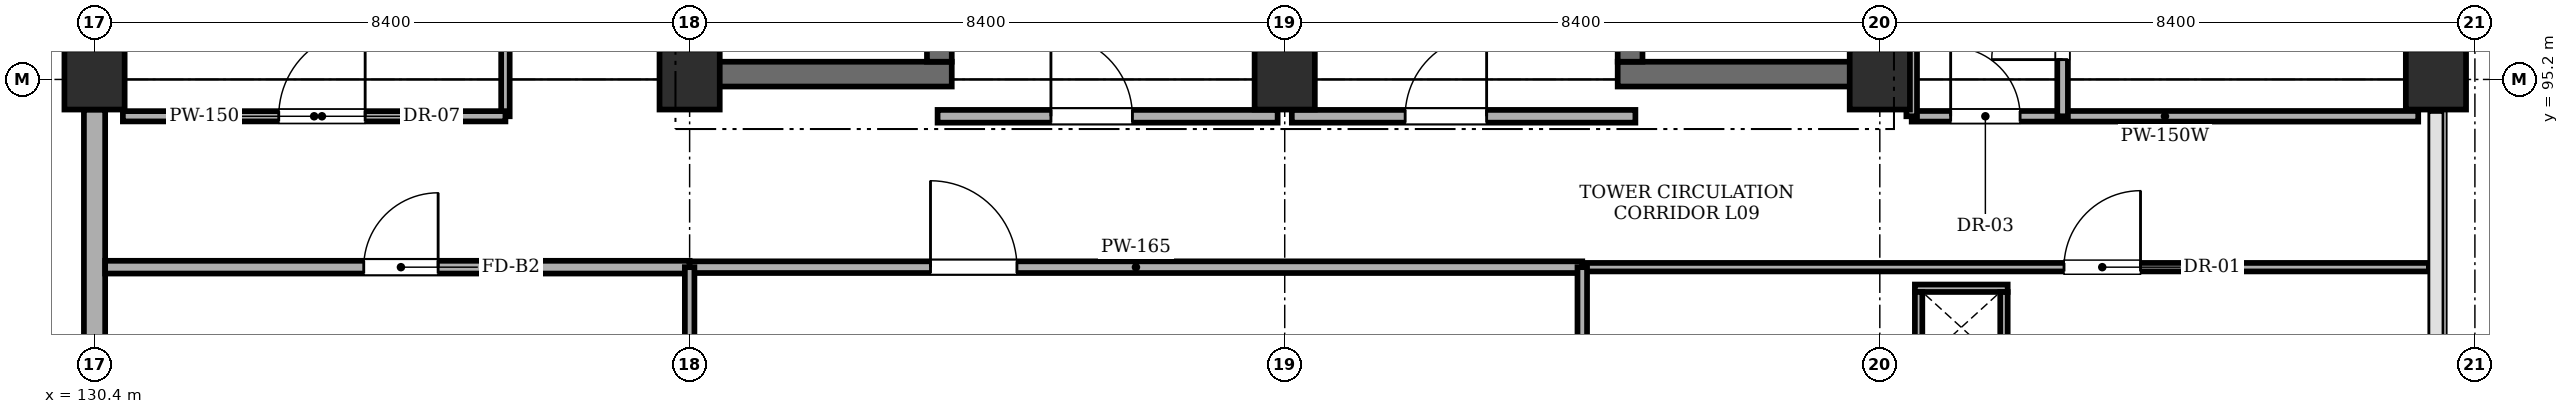
"""IFC4 building model, lengths in metres.
Left out: names, types, materials, properties, quantities, classifications, styles, units other than length and angle.
Written with IfcOpenShell. Run it as: python <this file> out.ifc"""

import sys

from ifc_helpers import new_model, si_unit, direction, frame, frame_2d, origin, origin_2d, place, context, subcontext, project, spatial, rectangle, extrude, element, fill, save


model = new_model("IFC4")
c1 = context("Model", 3, precision=1e-05, world=origin(), true_north=direction((0.0, 1.0)))
c2 = subcontext(c1, "Body", "Model", "MODEL_VIEW")
j1 = project(units=[si_unit("LENGTHUNIT", "METRE"), si_unit("PLANEANGLEUNIT", "RADIAN")], contexts=[c1])
p1 = place(None, origin())
s1 = spatial("IfcSite", under=j1, at=p1, CompositionType="ELEMENT")
p2 = place(p1, origin())
s2 = spatial("IfcBuilding", under=s1, at=p2, CompositionType="ELEMENT")
p3 = place(p2, frame((0.0, 0.0, 36.0)))
s3 = spatial("IfcBuildingStorey", under=s2, at=p3, CompositionType="ELEMENT", Elevation=36.0)
for number, where, z_axis, x_axis in (
    (1, (130.4, 95.2, 0.0), (0.0, 0.0, 1.0), (1.0, 0.0, 0.0)),
    (2, (138.8, 95.2, 0.0), (0.0, 0.0, 1.0), (1.0, 0.0, 0.0)),
    (3, (147.2, 95.2, 0.0), (0.0, 0.0, 1.0), (1.0, 0.0, 0.0)),
    (4, (155.6, 95.2, 0.0), (0.0, 0.0, 1.0), (1.0, 0.0, 0.0)),
    (5, (163.45, 95.2, 0.0), (0.0, 0.0, 1.0), (1.0, 0.0, 0.0)),
):
    element("IfcColumn", number, at=place(p3, frame(where, z_axis=z_axis, x_axis=x_axis)), inside=s3, PredefinedType="COLUMN", context=c2, shape_type="SweptSolid", body=[
        extrude(rectangle(XDim=0.85, YDim=0.85, at=origin_2d()), origin(), (0.0, 0.0, 1.0), 4.02),
    ])
p4 = place(p3, frame((138.7, 95.275, 0.0), z_axis=(0.0, 0.0, 1.0), x_axis=(1.0, 0.0, 0.0)))
e6 = element("IfcWall", 6, at=p4, inside=s3, PredefinedType="SHEAR", context=c2, shape_type="SweptSolid", body=[
    extrude(rectangle(XDim=3.8, YDim=0.35, at=frame_2d((1.9, 0.0))), origin(), (0.0, 0.0, 1.0), 4.02),
])
p5 = place(p3, frame((138.875, 95.45, 0.0), z_axis=(0.0, 0.0, 1.0), x_axis=(0.0, 1.0, 0.0)))
e7 = element("IfcWall", 7, at=p5, inside=s3, PredefinedType="SHEAR", context=c2, shape_type="SweptSolid", body=[
    extrude(rectangle(XDim=7.9, YDim=0.35, at=frame_2d((3.95, 0.0))), origin(), (0.0, 0.0, 1.0), 4.02),
])
p6 = place(p3, frame((142.325, 95.45, 0.0), z_axis=(0.0, 0.0, 1.0), x_axis=(0.0, 1.0, 0.0)))
e8 = element("IfcWall", 8, at=p6, inside=s3, PredefinedType="SHEAR", context=c2, shape_type="SweptSolid", body=[
    extrude(rectangle(XDim=7.9, YDim=0.35, at=frame_2d((3.95, 0.0))), origin(), (0.0, 0.0, 1.0), 4.02),
])
p7 = place(p6, frame((0.22, 0.0, 0.0)))
e9 = element("IfcOpeningElement", 9, at=p7, cuts=e8, PredefinedType="OPENING", context=c2, shape_type="SweptSolid", body=[
    extrude(rectangle(XDim=1.15, YDim=2.15, at=frame_2d((0.575, 1.075))), frame((0.0, 0.185, 0.0), z_axis=(0.0, -1.0, 0.0), x_axis=(1.0, 0.0, 0.0)), (0.0, 0.0, 1.0), 0.37),
])
p8 = place(p3, frame((151.9, 95.275, 0.0), z_axis=(0.0, 0.0, 1.0), x_axis=(1.0, 0.0, 0.0)))
e10 = element("IfcWall", 10, at=p8, inside=s3, PredefinedType="SHEAR", context=c2, shape_type="SweptSolid", body=[
    extrude(rectangle(XDim=3.8, YDim=0.35, at=frame_2d((1.9, 0.0))), origin(), (0.0, 0.0, 1.0), 4.02),
])
p9 = place(p3, frame((152.075, 95.45, 0.0), z_axis=(0.0, 0.0, 1.0), x_axis=(0.0, 1.0, 0.0)))
e11 = element("IfcWall", 11, at=p9, inside=s3, PredefinedType="SHEAR", context=c2, shape_type="SweptSolid", body=[
    extrude(rectangle(XDim=7.9, YDim=0.35, at=frame_2d((3.95, 0.0))), origin(), (0.0, 0.0, 1.0), 4.02),
])
p10 = place(p9, frame((0.35, 0.0, 0.0)))
e12 = element("IfcOpeningElement", 12, at=p10, cuts=e11, PredefinedType="OPENING", context=c2, shape_type="SweptSolid", body=[
    extrude(rectangle(XDim=1.15, YDim=2.15, at=frame_2d((0.575, 1.075))), frame((0.0, 0.185, 0.0), z_axis=(0.0, -1.0, 0.0), x_axis=(1.0, 0.0, 0.0)), (0.0, 0.0, 1.0), 0.37),
])
p11 = place(p3, frame((155.525, 95.45, 0.0), z_axis=(0.0, 0.0, 1.0), x_axis=(0.0, 1.0, 0.0)))
e13 = element("IfcWall", 13, at=p11, inside=s3, PredefinedType="SHEAR", context=c2, shape_type="SweptSolid", body=[
    extrude(rectangle(XDim=7.9, YDim=0.35, at=frame_2d((3.95, 0.0))), origin(), (0.0, 0.0, 1.0), 4.02),
])
p12 = place(p3, frame((130.4, 87.225, 0.0), z_axis=(0.0, 0.0, 1.0), x_axis=(0.0, 1.0, 0.0)))
e14 = element("IfcWall", 14, at=p12, inside=s3, PredefinedType="STANDARD", context=c2, shape_type="SweptSolid", body=[
    extrude(rectangle(XDim=7.55, YDim=0.3, at=frame_2d((3.775, 0.0))), origin(), (0.0, 0.0, 1.0), 3.32),
])
p13 = place(p12, frame((2.4, 0.0, 0.95)))
e15 = element("IfcOpeningElement", 15, at=p13, cuts=e14, PredefinedType="OPENING", context=c2, shape_type="SweptSolid", body=[
    extrude(rectangle(XDim=1.5, YDim=1.8, at=frame_2d((0.75, 0.9))), frame((0.0, 0.16, 0.0), z_axis=(0.0, -1.0, 0.0), x_axis=(1.0, 0.0, 0.0)), (0.0, 0.0, 1.0), 0.32),
])
p14 = place(p3, frame((142.3, 94.68, 0.0), z_axis=(0.0, 0.0, 1.0), x_axis=(1.0, 0.0, 0.0)))
e16 = element("IfcWall", 16, at=p14, inside=s3, PredefinedType="STANDARD", context=c2, shape_type="SweptSolid", body=[
    extrude(rectangle(XDim=4.8, YDim=0.18, at=frame_2d((2.4, 0.0))), origin(), (0.0, 0.0, 1.0), 4.02),
])
p15 = place(p14, frame((1.6, 0.0, 0.0)))
e17 = element("IfcOpeningElement", 17, at=p15, cuts=e16, PredefinedType="OPENING", context=c2, shape_type="SweptSolid", body=[
    extrude(rectangle(XDim=1.15, YDim=2.15, at=frame_2d((0.575, 1.075))), frame((0.0, 0.1, 0.0), z_axis=(0.0, -1.0, 0.0), x_axis=(1.0, 0.0, 0.0)), (0.0, 0.0, 1.0), 0.2),
])
p16 = place(p3, frame((147.3, 94.68, 0.0), z_axis=(0.0, 0.0, 1.0), x_axis=(1.0, 0.0, 0.0)))
e18 = element("IfcWall", 18, at=p16, inside=s3, PredefinedType="STANDARD", context=c2, shape_type="SweptSolid", body=[
    extrude(rectangle(XDim=4.85, YDim=0.18, at=frame_2d((2.425, 0.0))), origin(), (0.0, 0.0, 1.0), 4.02),
])
p17 = place(p16, frame((1.6, 0.0, 0.0)))
e19 = element("IfcOpeningElement", 19, at=p17, cuts=e18, PredefinedType="OPENING", context=c2, shape_type="SweptSolid", body=[
    extrude(rectangle(XDim=1.15, YDim=2.15, at=frame_2d((0.575, 1.075))), frame((0.0, 0.1, 0.0), z_axis=(0.0, -1.0, 0.0), x_axis=(1.0, 0.0, 0.0)), (0.0, 0.0, 1.0), 0.2),
])
p18 = place(p3, frame((156.05, 94.68, 0.0), z_axis=(0.0, 0.0, 1.0), x_axis=(1.0, 0.0, 0.0)))
e20 = element("IfcWall", 20, at=p18, inside=s3, PredefinedType="PARTITIONING", context=c2, shape_type="SweptSolid", body=[
    extrude(rectangle(XDim=7.15, YDim=0.15, at=frame_2d((3.575, 0.0))), origin(), (0.0, 0.0, 1.0), 4.02),
])
p19 = place(p18, frame((0.55, 0.0, 0.0)))
e21 = element("IfcOpeningElement", 21, at=p19, cuts=e20, PredefinedType="OPENING", context=c2, shape_type="SweptSolid", body=[
    extrude(rectangle(XDim=0.98, YDim=2.12, at=frame_2d((0.49, 1.06))), frame((0.0, 0.085, 0.0), z_axis=(0.0, -1.0, 0.0), x_axis=(1.0, 0.0, 0.0)), (0.0, 0.0, 1.0), 0.17),
])
p20 = place(p3, frame((158.18, 94.68, 0.0), z_axis=(0.0, 0.0, 1.0), x_axis=(0.0, 1.0, 0.0)))
e22 = element("IfcWall", 22, at=p20, inside=s3, PredefinedType="PARTITIONING", context=c2, shape_type="SweptSolid", body=[
    extrude(rectangle(XDim=8.57, YDim=0.15, at=frame_2d((4.285, 0.0))), origin(), (0.0, 0.0, 1.0), 4.02),
])
p21 = place(p20, frame((0.8, 0.0, 0.0)))
e23 = element("IfcOpeningElement", 23, at=p21, cuts=e22, PredefinedType="OPENING", context=c2, shape_type="SweptSolid", body=[
    extrude(rectangle(XDim=1.0, YDim=2.12, at=frame_2d((0.5, 1.06))), frame((0.0, 0.085, 0.0), z_axis=(0.0, -1.0, 0.0), x_axis=(1.0, 0.0, 0.0)), (0.0, 0.0, 1.0), 0.17),
])
p22 = place(p20, frame((3.5, 0.0, 0.0)))
e24 = element("IfcOpeningElement", 24, at=p22, cuts=e22, PredefinedType="OPENING", context=c2, shape_type="SweptSolid", body=[
    extrude(rectangle(XDim=0.92, YDim=2.1, at=frame_2d((0.46, 1.05))), frame((0.0, 0.085, 0.0), z_axis=(0.0, -1.0, 0.0), x_axis=(1.0, 0.0, 0.0)), (0.0, 0.0, 1.0), 0.17),
])
p23 = place(p20, frame((6.4, 0.0, 0.0)))
e25 = element("IfcOpeningElement", 25, at=p23, cuts=e22, PredefinedType="OPENING", context=c2, shape_type="SweptSolid", body=[
    extrude(rectangle(XDim=0.92, YDim=2.1, at=frame_2d((0.46, 1.05))), frame((0.0, 0.085, 0.0), z_axis=(0.0, -1.0, 0.0), x_axis=(1.0, 0.0, 0.0)), (0.0, 0.0, 1.0), 0.17),
])
p24 = place(p3, frame((156.05, 94.68, 0.0), z_axis=(0.0, 0.0, 1.0), x_axis=(0.0, 1.0, 0.0)))
e26 = element("IfcWall", 26, at=p24, inside=s3, PredefinedType="PARTITIONING", context=c2, shape_type="SweptSolid", body=[
    extrude(rectangle(XDim=8.57, YDim=0.15, at=frame_2d((4.285, 0.0))), origin(), (0.0, 0.0, 1.0), 4.02),
])
p25 = place(p3, frame((136.2, 94.68, 0.0), z_axis=(0.0, 0.0, 1.0), x_axis=(0.0, 1.0, 0.0)))
e27 = element("IfcWall", 27, at=p25, inside=s3, PredefinedType="PARTITIONING", context=c2, shape_type="SweptSolid", body=[
    extrude(rectangle(XDim=9.07, YDim=0.12, at=frame_2d((4.535, 0.0))), origin(), (0.0, 0.0, 1.0), 4.02),
])
p26 = place(p3, frame((130.8, 94.68, 0.0), z_axis=(0.0, 0.0, 1.0), x_axis=(1.0, 0.0, 0.0)))
e28 = element("IfcWall", 28, at=p26, inside=s3, PredefinedType="PARTITIONING", context=c2, shape_type="SweptSolid", body=[
    extrude(rectangle(XDim=5.4, YDim=0.145, at=frame_2d((2.7, 0.0))), origin(), (0.0, 0.0, 1.0), 4.02),
])
p27 = place(p26, frame((2.2, 0.0, 0.0)))
e29 = element("IfcOpeningElement", 29, at=p27, cuts=e28, PredefinedType="OPENING", context=c2, shape_type="SweptSolid", body=[
    extrude(rectangle(XDim=1.22, YDim=2.2, at=frame_2d((0.61, 1.1))), frame((0.0, 0.083, 0.0), z_axis=(0.0, -1.0, 0.0), x_axis=(1.0, 0.0, 0.0)), (0.0, 0.0, 1.0), 0.165),
])
p28 = place(p3, frame((130.55, 92.55, 0.0), z_axis=(0.0, 0.0, 1.0), x_axis=(1.0, 0.0, 0.0)))
e30 = element("IfcWall", 30, at=p28, inside=s3, PredefinedType="STANDARD", context=c2, shape_type="SweptSolid", body=[
    extrude(rectangle(XDim=8.25, YDim=0.18, at=frame_2d((4.125, 0.0))), origin(), (0.0, 0.0, 1.0), 4.02),
])
p29 = place(p28, frame((3.65, 0.0, 0.0)))
e31 = element("IfcOpeningElement", 31, at=p29, cuts=e30, PredefinedType="OPENING", context=c2, shape_type="SweptSolid", body=[
    extrude(rectangle(XDim=1.05, YDim=2.15, at=frame_2d((0.525, 1.075))), frame((0.0, 0.1, 0.0), z_axis=(0.0, -1.0, 0.0), x_axis=(1.0, 0.0, 0.0)), (0.0, 0.0, 1.0), 0.2),
])
p30 = place(p3, frame((138.8, 92.55, 0.0), z_axis=(0.0, 0.0, 1.0), x_axis=(1.0, 0.0, 0.0)))
e32 = element("IfcWall", 32, at=p30, inside=s3, PredefinedType="PARTITIONING", context=c2, shape_type="SweptSolid", body=[
    extrude(rectangle(XDim=12.6, YDim=0.165, at=frame_2d((6.3, 0.0))), origin(), (0.0, 0.0, 1.0), 4.02),
])
p31 = place(p30, frame((3.4, 0.0, 0.0)))
e33 = element("IfcOpeningElement", 33, at=p31, cuts=e32, PredefinedType="OPENING", context=c2, shape_type="SweptSolid", body=[
    extrude(rectangle(XDim=1.22, YDim=2.2, at=frame_2d((0.61, 1.1))), frame((0.0, 0.093, 0.0), z_axis=(0.0, -1.0, 0.0), x_axis=(1.0, 0.0, 0.0)), (0.0, 0.0, 1.0), 0.185),
])
p32 = place(p3, frame((138.8, 78.55, 0.0), z_axis=(0.0, 0.0, 1.0), x_axis=(0.0, 1.0, 0.0)))
e34 = element("IfcWall", 34, at=p32, inside=s3, PredefinedType="PARTITIONING", context=c2, shape_type="SweptSolid", body=[
    extrude(rectangle(XDim=14.0, YDim=0.135, at=frame_2d((7.0, 0.0))), origin(), (0.0, 0.0, 1.0), 3.32),
])
p33 = place(p3, frame((151.4, 92.55, 0.0), z_axis=(0.0, 0.0, 1.0), x_axis=(1.0, 0.0, 0.0)))
e35 = element("IfcWall", 35, at=p33, inside=s3, PredefinedType="PARTITIONING", context=c2, shape_type="SweptSolid", body=[
    extrude(rectangle(XDim=11.95, YDim=0.12, at=frame_2d((5.975, 0.0))), origin(), (0.0, 0.0, 1.0), 4.02),
])
p34 = place(p33, frame((6.8, 0.0, 0.0)))
e36 = element("IfcOpeningElement", 36, at=p34, cuts=e35, PredefinedType="OPENING", context=c2, shape_type="SweptSolid", body=[
    extrude(rectangle(XDim=1.08, YDim=2.15, at=frame_2d((0.54, 1.075))), frame((0.0, 0.07, 0.0), z_axis=(0.0, -1.0, 0.0), x_axis=(1.0, 0.0, 0.0)), (0.0, 0.0, 1.0), 0.14),
])
p35 = place(p3, frame((151.4, 78.55, 0.0), z_axis=(0.0, 0.0, 1.0), x_axis=(0.0, 1.0, 0.0)))
e37 = element("IfcWall", 37, at=p35, inside=s3, PredefinedType="PARTITIONING", context=c2, shape_type="SweptSolid", body=[
    extrude(rectangle(XDim=14.0, YDim=0.135, at=frame_2d((7.0, 0.0))), origin(), (0.0, 0.0, 1.0), 3.52),
])
p36 = place(p3, frame((156.095, 92.252, 0.0), z_axis=(0.0, 0.0, 1.0), x_axis=(1.0, 0.0, 0.0)))
e38 = element("IfcWall", 38, at=p36, inside=s3, PredefinedType="PARTITIONING", context=c2, shape_type="SweptSolid", body=[
    extrude(rectangle(XDim=1.31, YDim=0.105, at=frame_2d((0.655, 0.0))), origin(), (0.0, 0.0, 1.0), 4.02),
])
for number, where, z_axis, x_axis in (
    (39, (156.147, 91.2, 0.0), (0.0, 0.0, 1.0), (0.0, 1.0, 0.0)),
    (40, (157.353, 91.2, 0.0), (0.0, 0.0, 1.0), (0.0, 1.0, 0.0)),
):
    element("IfcWall", number, at=place(p3, frame(where, z_axis=z_axis, x_axis=x_axis)), inside=s3, PredefinedType="PARTITIONING", context=c2, shape_type="SweptSolid", body=[
        extrude(rectangle(XDim=1.0, YDim=0.105, at=frame_2d((0.5, 0.0))), origin(), (0.0, 0.0, 1.0), 4.02),
    ])
p37 = place(p15, origin())
e41 = element("IfcDoor", 41, at=p37, inside=s3, OperationType="SINGLE_SWING_LEFT", PredefinedType="DOOR", context=c2, shape_type="SweptSolid", body=[
    extrude(rectangle(XDim=1.15, YDim=2.15, at=frame_2d((0.575, 1.075))), frame((0.0, 0.025, 0.0), z_axis=(0.0, -1.0, 0.0), x_axis=(1.0, 0.0, 0.0)), (0.0, 0.0, 1.0), 0.05),
])
fill(e17, e41)
p38 = place(p17, origin())
e42 = element("IfcDoor", 42, at=p38, inside=s3, OperationType="SINGLE_SWING_RIGHT", PredefinedType="DOOR", context=c2, shape_type="SweptSolid", body=[
    extrude(rectangle(XDim=1.15, YDim=2.15, at=frame_2d((0.575, 1.075))), frame((0.0, 0.025, 0.0), z_axis=(0.0, -1.0, 0.0), x_axis=(1.0, 0.0, 0.0)), (0.0, 0.0, 1.0), 0.05),
])
fill(e19, e42)
p39 = place(p19, origin())
e43 = element("IfcDoor", 43, at=p39, inside=s3, OperationType="SINGLE_SWING_LEFT", PredefinedType="DOOR", context=c2, shape_type="SweptSolid", body=[
    extrude(rectangle(XDim=0.98, YDim=2.12, at=frame_2d((0.49, 1.06))), frame((0.0, 0.025, 0.0), z_axis=(0.0, -1.0, 0.0), x_axis=(1.0, 0.0, 0.0)), (0.0, 0.0, 1.0), 0.05),
])
fill(e21, e43)
p40 = place(p21, origin())
e44 = element("IfcDoor", 44, at=p40, inside=s3, OperationType="SINGLE_SWING_LEFT", PredefinedType="DOOR", context=c2, shape_type="SweptSolid", body=[
    extrude(rectangle(XDim=1.0, YDim=2.12, at=frame_2d((0.5, 1.06))), frame((0.0, 0.025, 0.0), z_axis=(0.0, -1.0, 0.0), x_axis=(1.0, 0.0, 0.0)), (0.0, 0.0, 1.0), 0.05),
])
fill(e23, e44)
p41 = place(p27, origin())
e45 = element("IfcDoor", 45, at=p41, inside=s3, OperationType="SINGLE_SWING_RIGHT", PredefinedType="DOOR", context=c2, shape_type="SweptSolid", body=[
    extrude(rectangle(XDim=1.22, YDim=2.2, at=frame_2d((0.61, 1.1))), frame((0.0, 0.025, 0.0), z_axis=(0.0, -1.0, 0.0), x_axis=(1.0, 0.0, 0.0)), (0.0, 0.0, 1.0), 0.05),
])
fill(e29, e45)
p42 = place(p29, origin())
e46 = element("IfcDoor", 46, at=p42, inside=s3, OperationType="SINGLE_SWING_RIGHT", PredefinedType="DOOR", context=c2, shape_type="SweptSolid", body=[
    extrude(rectangle(XDim=1.05, YDim=2.15, at=frame_2d((0.525, 1.075))), frame((0.0, 0.025, 0.0), z_axis=(0.0, -1.0, 0.0), x_axis=(1.0, 0.0, 0.0)), (0.0, 0.0, 1.0), 0.05),
])
fill(e31, e46)
p43 = place(p31, origin())
e47 = element("IfcDoor", 47, at=p43, inside=s3, OperationType="SINGLE_SWING_LEFT", PredefinedType="DOOR", context=c2, shape_type="SweptSolid", body=[
    extrude(rectangle(XDim=1.22, YDim=2.2, at=frame_2d((0.61, 1.1))), frame((0.0, 0.025, 0.0), z_axis=(0.0, -1.0, 0.0), x_axis=(1.0, 0.0, 0.0)), (0.0, 0.0, 1.0), 0.05),
])
fill(e33, e47)
p44 = place(p34, origin())
e48 = element("IfcDoor", 48, at=p44, inside=s3, OperationType="SINGLE_SWING_RIGHT", PredefinedType="DOOR", context=c2, shape_type="SweptSolid", body=[
    extrude(rectangle(XDim=1.08, YDim=2.15, at=frame_2d((0.54, 1.075))), frame((0.0, 0.025, 0.0), z_axis=(0.0, -1.0, 0.0), x_axis=(1.0, 0.0, 0.0)), (0.0, 0.0, 1.0), 0.05),
])
fill(e36, e48)
save(model, sys.argv[1])
